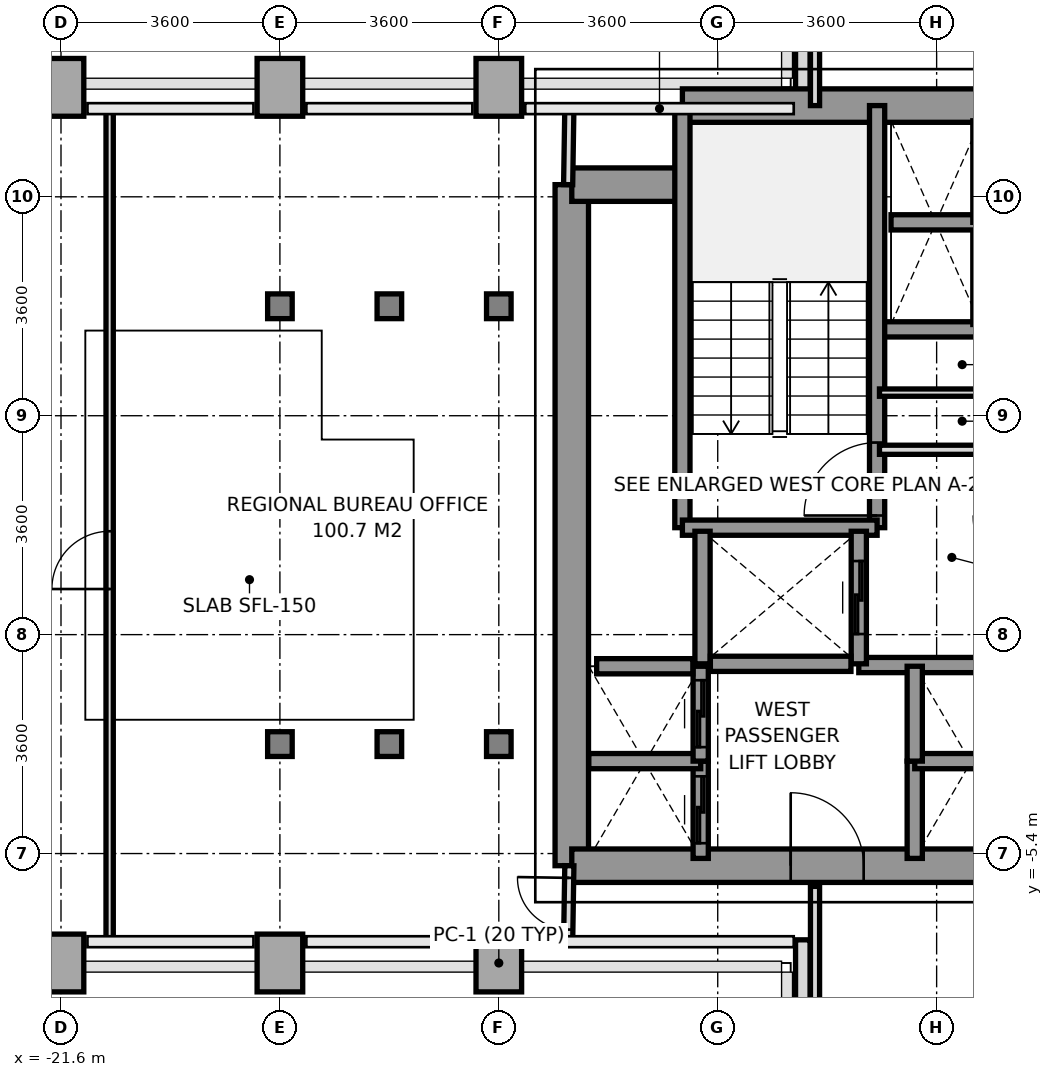
"""IFC4 building model, lengths in metres.
Left out: names, types, materials, properties, quantities, classifications, styles, units other than length and angle.
Written with IfcOpenShell. Run it as: python <this file> out.ifc"""

import sys

from ifc_helpers import new_model, si_unit, direction, frame, frame_2d, origin, origin_2d, place, context, subcontext, project, spatial, rectangle, i_section, extrude, source, transform, mapped, element, fill, save


model = new_model("IFC4")
c1 = context("Model", 3, precision=1e-05, world=origin(), true_north=direction((0.0, 1.0)))
c2 = subcontext(c1, "Body", "Model", "MODEL_VIEW")
j1 = project(units=[si_unit("LENGTHUNIT", "METRE"), si_unit("PLANEANGLEUNIT", "RADIAN")], contexts=[c1])
p1 = place(None, origin())
s1 = spatial("IfcSite", under=j1, at=p1, CompositionType="ELEMENT")
p2 = place(p1, origin())
s2 = spatial("IfcBuilding", under=s1, at=p2, CompositionType="ELEMENT")
p3 = place(p2, frame((0.0, 0.0, 40.8)))
s3 = spatial("IfcBuildingStorey", under=s2, at=p3, CompositionType="ELEMENT", Elevation=40.8)
m1 = source(origin(), c2, "Body", "SweptSolid", [
    extrude(rectangle(XDim=0.75, YDim=0.95, at=origin_2d()), origin(), (0.0, 0.0, 1.0), 3.2),
])
for number, where, z_axis, x_axis in (
    (1, (-21.6, -7.2, 0.0), (0.0, 0.0, 1.0), (1.0, 0.0, 0.0)),
    (2, (-21.6, 7.2, 0.0), (0.0, 0.0, 1.0), (1.0, 0.0, 0.0)),
    (3, (-18.0, -7.2, 0.0), (0.0, 0.0, 1.0), (1.0, 0.0, 0.0)),
):
    element("IfcColumn", number, at=place(p3, frame(where, z_axis=z_axis, x_axis=x_axis)), inside=s3, PredefinedType="COLUMN", context=c2, shape_type="MappedRepresentation", body=[
        mapped(m1, transform((0.0, 0.0, 0.0), x_axis=(1.0, 0.0, 0.0), y_axis=(0.0, 1.0, 0.0), z_axis=(0.0, 0.0, 1.0), scale=1.0)),
    ])
m2 = source(origin(), c2, "Body", "SweptSolid", [
    extrude(i_section(OverallWidth=0.404, OverallDepth=0.407, WebThickness=0.022, FlangeThickness=0.035, at=origin_2d()), origin(), (0.0, 0.0, 1.0), 3.2),
])
for number, where, z_axis, x_axis in (
    (4, (-18.0, -3.6, 0.0), (0.0, 0.0, 1.0), (1.0, 0.0, 0.0)),
    (5, (-18.0, 3.6, 0.0), (0.0, 0.0, 1.0), (1.0, 0.0, 0.0)),
):
    element("IfcColumn", number, at=place(p3, frame(where, z_axis=z_axis, x_axis=x_axis)), inside=s3, PredefinedType="COLUMN", context=c2, shape_type="MappedRepresentation", body=[
        mapped(m2, transform((0.0, 0.0, 0.0), x_axis=(1.0, 0.0, 0.0), y_axis=(0.0, 1.0, 0.0), z_axis=(0.0, 0.0, 1.0), scale=1.0)),
    ])
p4 = place(p3, frame((-18.0, 7.2, 0.0), z_axis=(0.0, 0.0, 1.0), x_axis=(1.0, 0.0, 0.0)))
e6 = element("IfcColumn", 6, at=p4, inside=s3, PredefinedType="COLUMN", context=c2, shape_type="MappedRepresentation", body=[
    mapped(m1, transform((0.0, 0.0, 0.0), x_axis=(1.0, 0.0, 0.0), y_axis=(0.0, 1.0, 0.0), z_axis=(0.0, 0.0, 1.0), scale=1.0)),
])
for number, where, z_axis, x_axis in (
    (7, (-16.2, -3.6, 0.0), (0.0, 0.0, 1.0), (1.0, 0.0, 0.0)),
    (8, (-16.2, 3.6, 0.0), (0.0, 0.0, 1.0), (1.0, 0.0, 0.0)),
):
    element("IfcColumn", number, at=place(p3, frame(where, z_axis=z_axis, x_axis=x_axis)), inside=s3, PredefinedType="COLUMN", context=c2, shape_type="MappedRepresentation", body=[
        mapped(m2, transform((0.0, 0.0, 0.0), x_axis=(1.0, 0.0, 0.0), y_axis=(0.0, 1.0, 0.0), z_axis=(0.0, 0.0, 1.0), scale=1.0)),
    ])
p5 = place(p3, frame((-14.4, -7.2, 0.0), z_axis=(0.0, 0.0, 1.0), x_axis=(1.0, 0.0, 0.0)))
e9 = element("IfcColumn", 9, at=p5, inside=s3, PredefinedType="COLUMN", context=c2, shape_type="MappedRepresentation", body=[
    mapped(m1, transform((0.0, 0.0, 0.0), x_axis=(1.0, 0.0, 0.0), y_axis=(0.0, 1.0, 0.0), z_axis=(0.0, 0.0, 1.0), scale=1.0)),
])
for number, where, z_axis, x_axis in (
    (10, (-14.4, -3.6, 0.0), (0.0, 0.0, 1.0), (1.0, 0.0, 0.0)),
    (11, (-14.4, 3.6, 0.0), (0.0, 0.0, 1.0), (1.0, 0.0, 0.0)),
):
    element("IfcColumn", number, at=place(p3, frame(where, z_axis=z_axis, x_axis=x_axis)), inside=s3, PredefinedType="COLUMN", context=c2, shape_type="MappedRepresentation", body=[
        mapped(m2, transform((0.0, 0.0, 0.0), x_axis=(1.0, 0.0, 0.0), y_axis=(0.0, 1.0, 0.0), z_axis=(0.0, 0.0, 1.0), scale=1.0)),
    ])
p6 = place(p3, frame((-14.4, 7.2, 0.0), z_axis=(0.0, 0.0, 1.0), x_axis=(1.0, 0.0, 0.0)))
e12 = element("IfcColumn", 12, at=p6, inside=s3, PredefinedType="COLUMN", context=c2, shape_type="MappedRepresentation", body=[
    mapped(m1, transform((0.0, 0.0, 0.0), x_axis=(1.0, 0.0, 0.0), y_axis=(0.0, 1.0, 0.0), z_axis=(0.0, 0.0, 1.0), scale=1.0)),
])
p7 = place(p3, frame((-9.4, -8.397, 0.0), z_axis=(0.0, 0.0, 1.0), x_axis=(0.0, 1.0, 0.0)))
e13 = element("IfcWall", 13, at=p7, inside=s3, PredefinedType="PARAPET", context=c2, shape_type="SweptSolid", body=[
    extrude(rectangle(XDim=1.578, YDim=0.24, at=frame_2d((0.789, 0.0))), origin(), (0.0, 0.0, 1.0), 1.15),
])
p8 = place(p3, frame((-9.4, 6.953, 0.0), z_axis=(0.0, 0.0, 1.0), x_axis=(0.0, 1.0, 0.0)))
e14 = element("IfcWall", 14, at=p8, inside=s3, PredefinedType="PARAPET", context=c2, shape_type="SweptSolid", body=[
    extrude(rectangle(XDim=1.444, YDim=0.24, at=frame_2d((0.722, 0.0))), origin(), (0.0, 0.0, 1.0), 1.15),
])
p9 = place(p3, frame((-13.2, -5.6, 0.0), z_axis=(0.0, 0.0, 1.0), x_axis=(0.0, 1.0, 0.0)))
e15 = element("IfcWall", 15, at=p9, inside=s3, PredefinedType="SHEAR", context=c2, shape_type="SweptSolid", body=[
    extrude(rectangle(XDim=11.2, YDim=0.55, at=frame_2d((5.6, 0.0))), origin(), (0.0, 0.0, 1.0), 3.2),
])
p10 = place(p3, frame((-11.381, 6.9, 0.0), z_axis=(0.0, 0.0, 1.0), x_axis=(1.0, 0.0, 0.0)))
e16 = element("IfcWall", 16, at=p10, inside=s3, PredefinedType="SHEAR", context=c2, shape_type="SweptSolid", body=[
    extrude(rectangle(XDim=5.981, YDim=0.55, at=frame_2d((2.991, 0.0))), origin(), (0.0, 0.0, 1.0), 3.2),
])
p11 = place(p3, frame((-13.2, 5.6, 0.0), z_axis=(0.0, 0.0, 1.0), x_axis=(1.0, 0.0, 0.0)))
e17 = element("IfcWall", 17, at=p11, inside=s3, PredefinedType="SHEAR", context=c2, shape_type="SweptSolid", body=[
    extrude(rectangle(XDim=1.819, YDim=0.55, at=frame_2d((0.909, 0.0))), origin(), (0.0, 0.0, 1.0), 3.2),
])
p12 = place(p3, frame((-13.2, -5.6, 0.0), z_axis=(0.0, 0.0, 1.0), x_axis=(1.0, 0.0, 0.0)))
e18 = element("IfcWall", 18, at=p12, inside=s3, PredefinedType="SHEAR", context=c2, shape_type="SweptSolid", body=[
    extrude(rectangle(XDim=7.8, YDim=0.55, at=frame_2d((3.9, 0.0))), origin(), (0.0, 0.0, 1.0), 3.2),
])
p13 = place(p12, frame((3.6, 0.0, 0.0)))
e19 = element("IfcOpeningElement", 19, at=p13, cuts=e18, PredefinedType="OPENING", context=c2, shape_type="SweptSolid", body=[
    extrude(rectangle(XDim=1.2, YDim=2.2, at=frame_2d((0.6, 1.1))), frame((0.0, 0.285, 0.0), z_axis=(0.0, -1.0, 0.0), x_axis=(1.0, 0.0, 0.0)), (0.0, 0.0, 1.0), 0.57),
])
p14 = place(p3, frame((-8.18, 3.22, 0.0), z_axis=(0.0, 0.0, 1.0), x_axis=(1.0, 0.0, 0.0)))
e20 = element("IfcWall", 20, at=p14, inside=s3, PredefinedType="SOLIDWALL", context=c2, shape_type="SweptSolid", body=[
    extrude(rectangle(XDim=2.78, YDim=0.25, at=frame_2d((1.39, 0.0))), origin(), (0.0, 0.0, 1.0), 3.2),
])
p15 = place(p3, frame((-8.48, -2.3, 0.0), z_axis=(0.0, 0.0, 1.0), x_axis=(1.0, 0.0, 0.0)))
e21 = element("IfcWall", 21, at=p15, inside=s3, PredefinedType="SOLIDWALL", context=c2, shape_type="SweptSolid", body=[
    extrude(rectangle(XDim=3.08, YDim=0.25, at=frame_2d((1.54, 0.0))), origin(), (0.0, 0.0, 1.0), 3.2),
])
p16 = place(p3, frame((-8.179, -0.041, 0.0), z_axis=(0.0, 0.0, 1.0), x_axis=(0.0, 1.0, 0.0)))
e22 = element("IfcWall", 22, at=p16, inside=s3, PredefinedType="SOLIDWALL", context=c2, shape_type="SweptSolid", body=[
    extrude(rectangle(XDim=6.941, YDim=0.25, at=frame_2d((3.47, 0.0))), origin(), (0.0, 0.0, 1.0), 3.2),
])
p17 = place(p16, frame((0.2, 0.0, 0.0)))
e23 = element("IfcOpeningElement", 23, at=p17, cuts=e22, PredefinedType="OPENING", context=c2, shape_type="SweptSolid", body=[
    extrude(rectangle(XDim=1.2, YDim=2.2, at=frame_2d((0.6, 1.1))), frame((0.0, 0.135, 0.0), z_axis=(0.0, -1.0, 0.0), x_axis=(1.0, 0.0, 0.0)), (0.0, 0.0, 1.0), 0.27),
])
p18 = place(p3, frame((-11.381, -0.041, 0.0), z_axis=(0.0, 0.0, 1.0), x_axis=(0.0, 1.0, 0.0)))
e24 = element("IfcWall", 24, at=p18, inside=s3, PredefinedType="SOLIDWALL", context=c2, shape_type="SweptSolid", body=[
    extrude(rectangle(XDim=6.941, YDim=0.25, at=frame_2d((3.47, 0.0))), origin(), (0.0, 0.0, 1.0), 3.2),
])
p19 = place(p3, frame((-11.381, -0.041, 0.0), z_axis=(0.0, 0.0, 1.0), x_axis=(1.0, 0.0, 0.0)))
e25 = element("IfcWall", 25, at=p19, inside=s3, PredefinedType="SOLIDWALL", context=c2, shape_type="SweptSolid", body=[
    extrude(rectangle(XDim=3.202, YDim=0.25, at=frame_2d((1.601, 0.0))), origin(), (0.0, 0.0, 1.0), 3.2),
])
p20 = place(p3, frame((-11.05, -2.28, 0.0), z_axis=(0.0, 0.0, 1.0), x_axis=(0.0, 1.0, 0.0)))
e26 = element("IfcWall", 26, at=p20, inside=s3, PredefinedType="SOLIDWALL", context=c2, shape_type="SweptSolid", body=[
    extrude(rectangle(XDim=2.18, YDim=0.25, at=frame_2d((1.09, 0.0))), origin(), (0.0, 0.0, 1.0), 3.2),
])
p21 = place(p3, frame((-8.48, -2.28, 0.0), z_axis=(0.0, 0.0, 1.0), x_axis=(0.0, 1.0, 0.0)))
e27 = element("IfcWall", 27, at=p21, inside=s3, PredefinedType="SOLIDWALL", context=c2, shape_type="SweptSolid", body=[
    extrude(rectangle(XDim=2.18, YDim=0.25, at=frame_2d((1.09, 0.0))), origin(), (0.0, 0.0, 1.0), 3.2),
])
p22 = place(p21, frame((0.49, 0.0, 0.0)))
e28 = element("IfcOpeningElement", 28, at=p22, cuts=e27, PredefinedType="OPENING", context=c2, shape_type="SweptSolid", body=[
    extrude(rectangle(XDim=1.2, YDim=2.2, at=frame_2d((0.6, 1.1))), frame((0.0, 0.135, 0.0), z_axis=(0.0, -1.0, 0.0), x_axis=(1.0, 0.0, 0.0)), (0.0, 0.0, 1.0), 0.27),
])
p23 = place(p3, frame((-10.921, -2.28, 0.0), z_axis=(0.0, 0.0, 1.0), x_axis=(1.0, 0.0, 0.0)))
e29 = element("IfcWall", 29, at=p23, inside=s3, PredefinedType="SOLIDWALL", context=c2, shape_type="SweptSolid", body=[
    extrude(rectangle(XDim=2.312, YDim=0.25, at=frame_2d((1.156, 0.0))), origin(), (0.0, 0.0, 1.0), 3.2),
])
p24 = place(p3, frame((-11.08, -5.48, 0.0), z_axis=(0.0, 0.0, 1.0), x_axis=(0.0, 1.0, 0.0)))
e30 = element("IfcWall", 30, at=p24, inside=s3, PredefinedType="SOLIDWALL", context=c2, shape_type="SweptSolid", body=[
    extrude(rectangle(XDim=1.6, YDim=0.25, at=frame_2d((0.8, 0.0))), origin(), (0.0, 0.0, 1.0), 3.2),
])
p25 = place(p24, frame((0.25, 0.0, 0.0)))
e31 = element("IfcOpeningElement", 31, at=p25, cuts=e30, PredefinedType="OPENING", context=c2, shape_type="SweptSolid", body=[
    extrude(rectangle(XDim=1.1, YDim=2.2, at=frame_2d((0.55, 1.1))), frame((0.0, 0.135, 0.0), z_axis=(0.0, -1.0, 0.0), x_axis=(1.0, 0.0, 0.0)), (0.0, 0.0, 1.0), 0.27),
])
p26 = place(p3, frame((-12.92, -3.88, 0.0), z_axis=(0.0, 0.0, 1.0), x_axis=(1.0, 0.0, 0.0)))
e32 = element("IfcWall", 32, at=p26, inside=s3, PredefinedType="SOLIDWALL", context=c2, shape_type="SweptSolid", body=[
    extrude(rectangle(XDim=1.84, YDim=0.25, at=frame_2d((0.92, 0.0))), origin(), (0.0, 0.0, 1.0), 3.2),
])
p27 = place(p3, frame((-11.08, -3.88, 0.0), z_axis=(0.0, 0.0, 1.0), x_axis=(0.0, 1.0, 0.0)))
e33 = element("IfcWall", 33, at=p27, inside=s3, PredefinedType="SOLIDWALL", context=c2, shape_type="SweptSolid", body=[
    extrude(rectangle(XDim=1.56, YDim=0.25, at=frame_2d((0.78, 0.0))), origin(), (0.0, 0.0, 1.0), 3.2),
])
p28 = place(p27, frame((0.23, 0.0, 0.0)))
e34 = element("IfcOpeningElement", 34, at=p28, cuts=e33, PredefinedType="OPENING", context=c2, shape_type="SweptSolid", body=[
    extrude(rectangle(XDim=1.1, YDim=2.2, at=frame_2d((0.55, 1.1))), frame((0.0, 0.135, 0.0), z_axis=(0.0, -1.0, 0.0), x_axis=(1.0, 0.0, 0.0)), (0.0, 0.0, 1.0), 0.27),
])
p29 = place(p3, frame((-12.791, -2.32, 0.0), z_axis=(0.0, 0.0, 1.0), x_axis=(1.0, 0.0, 0.0)))
e35 = element("IfcWall", 35, at=p29, inside=s3, PredefinedType="SOLIDWALL", context=c2, shape_type="SweptSolid", body=[
    extrude(rectangle(XDim=1.582, YDim=0.25, at=frame_2d((0.791, 0.0))), origin(), (0.0, 0.0, 1.0), 3.2),
])
p30 = place(p3, frame((-7.56, -5.48, 0.0), z_axis=(0.0, 0.0, 1.0), x_axis=(0.0, 1.0, 0.0)))
e36 = element("IfcWall", 36, at=p30, inside=s3, PredefinedType="SOLIDWALL", context=c2, shape_type="SweptSolid", body=[
    extrude(rectangle(XDim=1.6, YDim=0.25, at=frame_2d((0.8, 0.0))), origin(), (0.0, 0.0, 1.0), 3.2),
])
p31 = place(p3, frame((-7.56, -3.88, 0.0), z_axis=(0.0, 0.0, 1.0), x_axis=(1.0, 0.0, 0.0)))
e37 = element("IfcWall", 37, at=p31, inside=s3, PredefinedType="SOLIDWALL", context=c2, shape_type="SweptSolid", body=[
    extrude(rectangle(XDim=1.84, YDim=0.25, at=frame_2d((0.92, 0.0))), origin(), (0.0, 0.0, 1.0), 3.2),
])
p32 = place(p3, frame((-7.56, -3.88, 0.0), z_axis=(0.0, 0.0, 1.0), x_axis=(0.0, 1.0, 0.0)))
e38 = element("IfcWall", 38, at=p32, inside=s3, PredefinedType="SOLIDWALL", context=c2, shape_type="SweptSolid", body=[
    extrude(rectangle(XDim=1.56, YDim=0.25, at=frame_2d((0.78, 0.0))), origin(), (0.0, 0.0, 1.0), 3.2),
])
p33 = place(p3, frame((-6.48, 3.3, 0.0), z_axis=(0.0, 0.0, 1.0), x_axis=(0.0, 1.0, 0.0)))
e39 = element("IfcWall", 39, at=p33, inside=s3, PredefinedType="SOLIDWALL", context=c2, shape_type="SweptSolid", body=[
    extrude(rectangle(XDim=1.68, YDim=0.25, at=frame_2d((0.84, 0.0))), origin(), (0.0, 0.0, 1.0), 3.2),
])
p34 = place(p3, frame((-7.95, 4.98, 0.0), z_axis=(0.0, 0.0, 1.0), x_axis=(1.0, 0.0, 0.0)))
e40 = element("IfcWall", 40, at=p34, inside=s3, PredefinedType="SOLIDWALL", context=c2, shape_type="SweptSolid", body=[
    extrude(rectangle(XDim=1.47, YDim=0.25, at=frame_2d((0.735, 0.0))), origin(), (0.0, 0.0, 1.0), 3.2),
])
p35 = place(p3, frame((-6.48, 4.98, 0.0), z_axis=(0.0, 0.0, 1.0), x_axis=(0.0, 1.0, 0.0)))
e41 = element("IfcWall", 41, at=p35, inside=s3, PredefinedType="SOLIDWALL", context=c2, shape_type="SweptSolid", body=[
    extrude(rectangle(XDim=1.67, YDim=0.25, at=frame_2d((0.835, 0.0))), origin(), (0.0, 0.0, 1.0), 3.2),
])
p36 = place(p3, frame((-8.14, 1.24, 0.0), z_axis=(0.0, 0.0, 1.0), x_axis=(1.0, 0.0, 0.0)))
e42 = element("IfcWall", 42, at=p36, inside=s3, PredefinedType="PARTITIONING", context=c2, shape_type="SweptSolid", body=[
    extrude(rectangle(XDim=2.39, YDim=0.15, at=frame_2d((1.195, 0.0))), origin(), (0.0, 0.0, 1.0), 2.3),
])
p37 = place(p3, frame((-8.14, 2.18, 0.0), z_axis=(0.0, 0.0, 1.0), x_axis=(1.0, 0.0, 0.0)))
e43 = element("IfcWall", 43, at=p37, inside=s3, PredefinedType="PARTITIONING", context=c2, shape_type="SweptSolid", body=[
    extrude(rectangle(XDim=2.39, YDim=0.12, at=frame_2d((1.195, 0.0))), origin(), (0.0, 0.0, 1.0), 2.3),
])
p38 = place(p3, frame((-9.2, 6.9, 0.0), z_axis=(0.0, 0.0, 1.0), x_axis=(0.0, 1.0, 0.0)))
e44 = element("IfcWall", 44, at=p38, inside=s3, PredefinedType="PARTITIONING", context=c2, shape_type="SweptSolid", body=[
    extrude(rectangle(XDim=8.78, YDim=0.15, at=frame_2d((4.39, 0.0))), origin(), (0.0, 0.0, 1.0), 2.71),
])
p39 = place(p3, frame((-9.2, -15.68, 0.0), z_axis=(0.0, 0.0, 1.0), x_axis=(0.0, 1.0, 0.0)))
e45 = element("IfcWall", 45, at=p39, inside=s3, PredefinedType="PARTITIONING", context=c2, shape_type="SweptSolid", body=[
    extrude(rectangle(XDim=9.74, YDim=0.15, at=frame_2d((4.87, 0.0))), origin(), (0.0, 0.0, 1.0), 2.71),
])
p40 = place(p3, frame((-13.26, 5.6, 0.0), z_axis=(0.0, 0.0, 1.0), x_axis=(0.016013571389, 0.999871774545, 0.0)))
e46 = element("IfcWall", 46, at=p40, inside=s3, PredefinedType="PARTITIONING", context=c2, shape_type="SweptSolid", body=[
    extrude(rectangle(XDim=1.25, YDim=0.15, at=frame_2d((0.625, 0.0))), origin(), (0.0, 0.0, 1.0), 3.2),
])
p41 = place(p3, frame((-13.26, -6.85, 0.0), z_axis=(0.0, 0.0, 1.0), x_axis=(0.016013571389, 0.999871774545, 0.0)))
e47 = element("IfcWall", 47, at=p41, inside=s3, PredefinedType="PARTITIONING", context=c2, shape_type="SweptSolid", body=[
    extrude(rectangle(XDim=1.25, YDim=0.15, at=frame_2d((0.625, 0.0))), origin(), (0.0, 0.0, 1.0), 3.2),
])
p42 = place(p41, frame((0.2, 0.0, 0.0)))
e48 = element("IfcOpeningElement", 48, at=p42, cuts=e47, PredefinedType="OPENING", context=c2, shape_type="SweptSolid", body=[
    extrude(rectangle(XDim=0.85, YDim=2.1, at=frame_2d((0.425, 1.05))), frame((0.0, 0.085, 0.0), z_axis=(0.0, -1.0, 0.0), x_axis=(1.0, 0.0, 0.0)), (0.0, 0.0, 1.0), 0.17),
])
p43 = place(p3, frame((-20.8, -6.85, 0.0), z_axis=(0.0, 0.0, 1.0), x_axis=(0.0, 1.0, 0.0)))
e49 = element("IfcWall", 49, at=p43, inside=s3, PredefinedType="PARTITIONING", context=c2, shape_type="SweptSolid", body=[
    extrude(rectangle(XDim=13.7, YDim=0.12, at=frame_2d((6.85, 0.0))), origin(), (0.0, 0.0, 1.0), 2.71),
])
p44 = place(p43, frame((5.8, 0.0, 0.0)))
e50 = element("IfcOpeningElement", 50, at=p44, cuts=e49, PredefinedType="OPENING", context=c2, shape_type="SweptSolid", body=[
    extrude(rectangle(XDim=0.95, YDim=2.15, at=frame_2d((0.475, 1.075))), frame((0.0, 0.07, 0.0), z_axis=(0.0, -1.0, 0.0), x_axis=(1.0, 0.0, 0.0)), (0.0, 0.0, 1.0), 0.14),
])
m3 = source(origin(), c2, "Body", "SweptSolid", [
    extrude(rectangle(XDim=1.2, YDim=2.2, at=frame_2d((0.6, 1.1))), frame((0.0, 0.025, 0.0), z_axis=(0.0, -1.0, 0.0), x_axis=(1.0, 0.0, 0.0)), (0.0, 0.0, 1.0), 0.05),
])
p45 = place(p17, origin())
e51 = element("IfcDoor", 51, at=p45, inside=s3, OperationType="SINGLE_SWING_LEFT", PredefinedType="DOOR", context=c2, shape_type="MappedRepresentation", body=[
    mapped(m3, transform((0.0, 0.0, 0.0), x_axis=(1.0, 0.0, 0.0), y_axis=(0.0, 1.0, 0.0), z_axis=(0.0, 0.0, 1.0), scale=1.0)),
])
fill(e23, e51)
p46 = place(p13, origin())
e52 = element("IfcDoor", 52, at=p46, inside=s3, OperationType="SINGLE_SWING_LEFT", PredefinedType="DOOR", context=c2, shape_type="MappedRepresentation", body=[
    mapped(m3, transform((0.0, 0.0, 0.0), x_axis=(1.0, 0.0, 0.0), y_axis=(0.0, 1.0, 0.0), z_axis=(0.0, 0.0, 1.0), scale=1.0)),
])
fill(e19, e52)
p47 = place(p22, origin())
e53 = element("IfcDoor", 53, at=p47, inside=s3, OperationType="SLIDING_TO_RIGHT", PredefinedType="DOOR", context=c2, shape_type="MappedRepresentation", body=[
    mapped(m3, transform((0.0, 0.0, 0.0), x_axis=(1.0, 0.0, 0.0), y_axis=(0.0, 1.0, 0.0), z_axis=(0.0, 0.0, 1.0), scale=1.0)),
])
fill(e28, e53)
m4 = source(origin(), c2, "Body", "SweptSolid", [
    extrude(rectangle(XDim=1.1, YDim=2.2, at=frame_2d((0.55, 1.1))), frame((0.0, 0.025, 0.0), z_axis=(0.0, -1.0, 0.0), x_axis=(1.0, 0.0, 0.0)), (0.0, 0.0, 1.0), 0.05),
])
p48 = place(p25, origin())
e54 = element("IfcDoor", 54, at=p48, inside=s3, OperationType="SLIDING_TO_LEFT", PredefinedType="DOOR", context=c2, shape_type="MappedRepresentation", body=[
    mapped(m4, transform((0.0, 0.0, 0.0), x_axis=(1.0, 0.0, 0.0), y_axis=(0.0, 1.0, 0.0), z_axis=(0.0, 0.0, 1.0), scale=1.0)),
])
fill(e31, e54)
p49 = place(p28, origin())
e55 = element("IfcDoor", 55, at=p49, inside=s3, OperationType="SLIDING_TO_LEFT", PredefinedType="DOOR", context=c2, shape_type="MappedRepresentation", body=[
    mapped(m4, transform((0.0, 0.0, 0.0), x_axis=(1.0, 0.0, 0.0), y_axis=(0.0, 1.0, 0.0), z_axis=(0.0, 0.0, 1.0), scale=1.0)),
])
fill(e34, e55)
m5 = source(origin(), c2, "Body", "SweptSolid", [
    extrude(rectangle(XDim=0.85, YDim=2.1, at=frame_2d((0.425, 1.05))), frame((0.0, 0.025, 0.0), z_axis=(0.0, -1.0, 0.0), x_axis=(1.0, 0.0, 0.0)), (0.0, 0.0, 1.0), 0.05),
])
p50 = place(p42, origin())
e56 = element("IfcDoor", 56, at=p50, inside=s3, OperationType="SINGLE_SWING_RIGHT", PredefinedType="DOOR", context=c2, shape_type="MappedRepresentation", body=[
    mapped(m5, transform((0.0, 0.0, 0.0), x_axis=(1.0, 0.0, 0.0), y_axis=(0.0, 1.0, 0.0), z_axis=(0.0, 0.0, 1.0), scale=1.0)),
])
fill(e48, e56)
m6 = source(origin(), c2, "Body", "SweptSolid", [
    extrude(rectangle(XDim=0.95, YDim=2.15, at=frame_2d((0.475, 1.075))), frame((0.0, 0.025, 0.0), z_axis=(0.0, -1.0, 0.0), x_axis=(1.0, 0.0, 0.0)), (0.0, 0.0, 1.0), 0.05),
])
p51 = place(p44, origin())
e57 = element("IfcDoor", 57, at=p51, inside=s3, OperationType="SINGLE_SWING_LEFT", PredefinedType="DOOR", context=c2, shape_type="MappedRepresentation", body=[
    mapped(m6, transform((0.0, 0.0, 0.0), x_axis=(1.0, 0.0, 0.0), y_axis=(0.0, 1.0, 0.0), z_axis=(0.0, 0.0, 1.0), scale=1.0)),
])
fill(e50, e57)
save(model, sys.argv[1])
